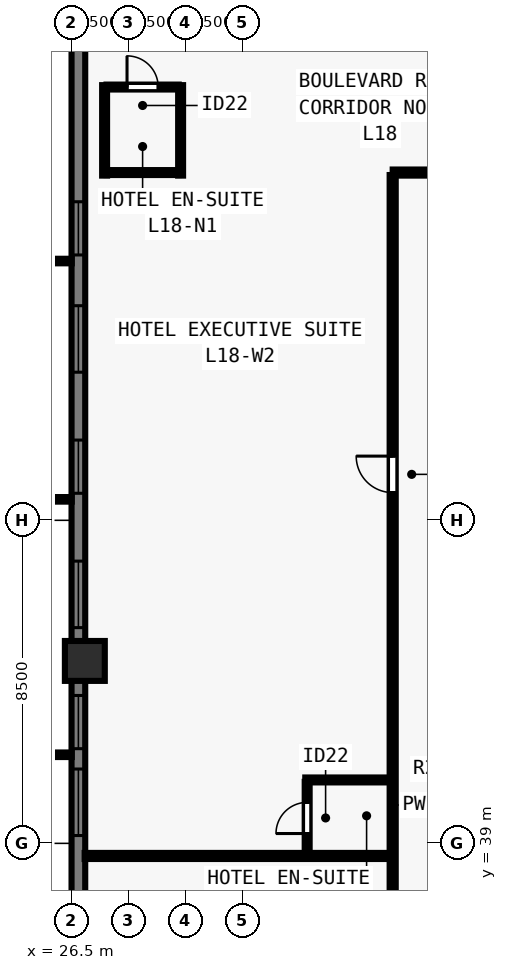
"""IFC4 building model, lengths in metres.
Left out: names, types, materials, properties, quantities, classifications, styles, units other than length and angle.
Written with IfcOpenShell. Run it as: python <this file> out.ifc"""

import sys

from ifc_helpers import new_model, si_unit, direction, frame, frame_2d, origin, origin_2d, place, context, subcontext, project, spatial, rectangle, extrude, element, fill, save


model = new_model("IFC4")
c1 = context("Model", 3, precision=1e-05, world=origin(), true_north=direction((0.0, 1.0)))
c2 = subcontext(c1, "Body", "Model", "MODEL_VIEW")
j1 = project(units=[si_unit("LENGTHUNIT", "METRE"), si_unit("PLANEANGLEUNIT", "RADIAN")], contexts=[c1])
p1 = place(None, origin())
s1 = spatial("IfcSite", under=j1, at=p1, CompositionType="ELEMENT")
p2 = place(p1, origin())
s2 = spatial("IfcBuilding", under=s1, at=p2, CompositionType="ELEMENT")
p3 = place(p2, frame((0.0, 0.0, 69.0)))
s3 = spatial("IfcBuildingStorey", under=s2, at=p3, CompositionType="ELEMENT", Elevation=69.0)
p4 = place(p3, frame((26.85, 43.8, 0.0), z_axis=(0.0, 0.0, 1.0), x_axis=(0.0, 1.0, 0.0)))
e1 = element("IfcColumn", 1, at=p4, inside=s3, PredefinedType="COLUMN", context=c2, shape_type="SweptSolid", body=[
    extrude(rectangle(XDim=1.05, YDim=1.05, at=origin_2d()), origin(), (0.0, 0.0, 1.0), 3.5),
])
p5 = place(p3, frame((26.68, 16.5, 0.0), z_axis=(0.0, 0.0, 1.0), x_axis=(0.0, 1.0, 0.0)))
e2 = element("IfcWall", 2, at=p5, inside=s3, PredefinedType="SOLIDWALL", context=c2, shape_type="SweptSolid", body=[
    extrude(rectangle(XDim=44.662, YDim=0.36, at=frame_2d((22.331, 0.0))), origin(), (0.0, 0.0, 1.0), 3.28),
])
p6 = place(p5, frame((5.28, 0.0, 0.8)))
e3 = element("IfcOpeningElement", 3, at=p6, cuts=e2, PredefinedType="OPENING", context=c2, shape_type="SweptSolid", body=[
    extrude(rectangle(XDim=1.4, YDim=1.544, at=frame_2d((0.7, 0.772))), frame((0.0, 0.19, 0.0), z_axis=(0.0, -1.0, 0.0), x_axis=(1.0, 0.0, 0.0)), (0.0, 0.0, 1.0), 0.38),
])
p7 = place(p5, frame((8.015, 0.0, 0.8)))
e4 = element("IfcOpeningElement", 4, at=p7, cuts=e2, PredefinedType="OPENING", context=c2, shape_type="SweptSolid", body=[
    extrude(rectangle(XDim=1.75, YDim=1.544, at=frame_2d((0.875, 0.772))), frame((0.0, 0.19, 0.0), z_axis=(0.0, -1.0, 0.0), x_axis=(1.0, 0.0, 0.0)), (0.0, 0.0, 1.0), 0.38),
])
p8 = place(p5, frame((11.551, 0.0, 0.8)))
e5 = element("IfcOpeningElement", 5, at=p8, cuts=e2, PredefinedType="OPENING", context=c2, shape_type="SweptSolid", body=[
    extrude(rectangle(XDim=1.4, YDim=1.544, at=frame_2d((0.7, 0.772))), frame((0.0, 0.19, 0.0), z_axis=(0.0, -1.0, 0.0), x_axis=(1.0, 0.0, 0.0)), (0.0, 0.0, 1.0), 0.38),
])
p9 = place(p5, frame((14.736, 0.0, 0.8)))
e6 = element("IfcOpeningElement", 6, at=p9, cuts=e2, PredefinedType="OPENING", context=c2, shape_type="SweptSolid", body=[
    extrude(rectangle(XDim=1.75, YDim=1.544, at=frame_2d((0.875, 0.772))), frame((0.0, 0.19, 0.0), z_axis=(0.0, -1.0, 0.0), x_axis=(1.0, 0.0, 0.0)), (0.0, 0.0, 1.0), 0.38),
])
p10 = place(p5, frame((18.721, 0.0, 0.8)))
e7 = element("IfcOpeningElement", 7, at=p10, cuts=e2, PredefinedType="OPENING", context=c2, shape_type="SweptSolid", body=[
    extrude(rectangle(XDim=1.4, YDim=1.544, at=frame_2d((0.7, 0.772))), frame((0.0, 0.19, 0.0), z_axis=(0.0, -1.0, 0.0), x_axis=(1.0, 0.0, 0.0)), (0.0, 0.0, 1.0), 0.38),
])
p11 = place(p5, frame((22.706, 0.0, 0.8)))
e8 = element("IfcOpeningElement", 8, at=p11, cuts=e2, PredefinedType="OPENING", context=c2, shape_type="SweptSolid", body=[
    extrude(rectangle(XDim=1.75, YDim=1.544, at=frame_2d((0.875, 0.772))), frame((0.0, 0.19, 0.0), z_axis=(0.0, -1.0, 0.0), x_axis=(1.0, 0.0, 0.0)), (0.0, 0.0, 1.0), 0.38),
])
p12 = place(p5, frame((24.991, 0.0, 0.8)))
e9 = element("IfcOpeningElement", 9, at=p12, cuts=e2, PredefinedType="OPENING", context=c2, shape_type="SweptSolid", body=[
    extrude(rectangle(XDim=1.4, YDim=1.544, at=frame_2d((0.7, 0.772))), frame((0.0, 0.19, 0.0), z_axis=(0.0, -1.0, 0.0), x_axis=(1.0, 0.0, 0.0)), (0.0, 0.0, 1.0), 0.38),
])
p13 = place(p5, frame((28.177, 0.0, 0.8)))
e10 = element("IfcOpeningElement", 10, at=p13, cuts=e2, PredefinedType="OPENING", context=c2, shape_type="SweptSolid", body=[
    extrude(rectangle(XDim=1.75, YDim=1.544, at=frame_2d((0.875, 0.772))), frame((0.0, 0.19, 0.0), z_axis=(0.0, -1.0, 0.0), x_axis=(1.0, 0.0, 0.0)), (0.0, 0.0, 1.0), 0.38),
])
p14 = place(p5, frame((31.711, 0.0, 0.8)))
e11 = element("IfcOpeningElement", 11, at=p14, cuts=e2, PredefinedType="OPENING", context=c2, shape_type="SweptSolid", body=[
    extrude(rectangle(XDim=1.4, YDim=1.544, at=frame_2d((0.7, 0.772))), frame((0.0, 0.19, 0.0), z_axis=(0.0, -1.0, 0.0), x_axis=(1.0, 0.0, 0.0)), (0.0, 0.0, 1.0), 0.38),
])
p15 = place(p5, frame((34.897, 0.0, 0.8)))
e12 = element("IfcOpeningElement", 12, at=p15, cuts=e2, PredefinedType="OPENING", context=c2, shape_type="SweptSolid", body=[
    extrude(rectangle(XDim=1.75, YDim=1.544, at=frame_2d((0.875, 0.772))), frame((0.0, 0.19, 0.0), z_axis=(0.0, -1.0, 0.0), x_axis=(1.0, 0.0, 0.0)), (0.0, 0.0, 1.0), 0.38),
])
p16 = place(p5, frame((37.982, 0.0, 0.8)))
e13 = element("IfcOpeningElement", 13, at=p16, cuts=e2, PredefinedType="OPENING", context=c2, shape_type="SweptSolid", body=[
    extrude(rectangle(XDim=1.4, YDim=1.544, at=frame_2d((0.7, 0.772))), frame((0.0, 0.19, 0.0), z_axis=(0.0, -1.0, 0.0), x_axis=(1.0, 0.0, 0.0)), (0.0, 0.0, 1.0), 0.38),
])
p17 = place(p3, frame((34.95, 56.65, 0.0), z_axis=(0.0, 0.0, 1.0), x_axis=(1.0, 0.0, 0.0)))
e14 = element("IfcWall", 14, at=p17, inside=s3, PredefinedType="PARTITIONING", context=c2, shape_type="SweptSolid", body=[
    extrude(rectangle(XDim=34.1, YDim=0.16, at=frame_2d((17.05, 0.0))), origin(), (0.0, 0.0, 1.0), 3.28),
])
p18 = place(p17, frame((4.166, 0.0, 0.0)))
e15 = element("IfcOpeningElement", 15, at=p18, cuts=e14, PredefinedType="OPENING", context=c2, shape_type="SweptSolid", body=[
    extrude(rectangle(XDim=0.96, YDim=2.15, at=frame_2d((0.48, 1.075))), frame((0.0, 0.09, 0.0), z_axis=(0.0, -1.0, 0.0), x_axis=(1.0, 0.0, 0.0)), (0.0, 0.0, 1.0), 0.18),
])
p19 = place(p17, frame((17.73, 0.0, 0.0)))
e16 = element("IfcOpeningElement", 16, at=p19, cuts=e14, PredefinedType="OPENING", context=c2, shape_type="SweptSolid", body=[
    extrude(rectangle(XDim=0.96, YDim=2.15, at=frame_2d((0.48, 1.075))), frame((0.0, 0.09, 0.0), z_axis=(0.0, -1.0, 0.0), x_axis=(1.0, 0.0, 0.0)), (0.0, 0.0, 1.0), 0.18),
])
p20 = place(p17, frame((30.134, 0.0, 0.0)))
e17 = element("IfcOpeningElement", 17, at=p20, cuts=e14, PredefinedType="OPENING", context=c2, shape_type="SweptSolid", body=[
    extrude(rectangle(XDim=0.96, YDim=2.15, at=frame_2d((0.48, 1.075))), frame((0.0, 0.09, 0.0), z_axis=(0.0, -1.0, 0.0), x_axis=(1.0, 0.0, 0.0)), (0.0, 0.0, 1.0), 0.18),
])
p21 = place(p3, frame((34.95, 21.415, 0.0), z_axis=(0.0, 0.0, 1.0), x_axis=(0.0, 1.0, 0.0)))
e18 = element("IfcWall", 18, at=p21, inside=s3, PredefinedType="PARTITIONING", context=c2, shape_type="SweptSolid", body=[
    extrude(rectangle(XDim=35.17, YDim=0.16, at=frame_2d((17.585, 0.0))), origin(), (0.0, 0.0, 1.0), 3.28),
])
p22 = place(p21, frame((9.414, 0.0, 0.0)))
e19 = element("IfcOpeningElement", 19, at=p22, cuts=e18, PredefinedType="OPENING", context=c2, shape_type="SweptSolid", body=[
    extrude(rectangle(XDim=0.96, YDim=2.15, at=frame_2d((0.48, 1.075))), frame((0.0, 0.09, 0.0), z_axis=(0.0, -1.0, 0.0), x_axis=(1.0, 0.0, 0.0)), (0.0, 0.0, 1.0), 0.18),
])
p23 = place(p21, frame((26.814, 0.0, 0.0)))
e20 = element("IfcOpeningElement", 20, at=p23, cuts=e18, PredefinedType="OPENING", context=c2, shape_type="SweptSolid", body=[
    extrude(rectangle(XDim=0.96, YDim=2.15, at=frame_2d((0.48, 1.075))), frame((0.0, 0.09, 0.0), z_axis=(0.0, -1.0, 0.0), x_axis=(1.0, 0.0, 0.0)), (0.0, 0.0, 1.0), 0.18),
])
for number, where, z_axis, x_axis in (
    (21, (27.37, 56.57, 0.0), (0.0, 0.0, 1.0), (0.0, 1.0, 0.0)),
    (22, (29.37, 56.57, 0.0), (0.0, 0.0, 1.0), (0.0, 1.0, 0.0)),
):
    element("IfcWall", number, at=place(p3, frame(where, z_axis=z_axis, x_axis=x_axis)), inside=s3, PredefinedType="PLUMBINGWALL", context=c2, shape_type="SweptSolid", body=[
        extrude(rectangle(XDim=2.38, YDim=0.13, at=frame_2d((1.19, 0.0))), origin(), (0.0, 0.0, 1.0), 3.28),
    ])
p24 = place(p3, frame((27.42, 58.9, 0.0), z_axis=(0.0, 0.0, 1.0), x_axis=(1.0, 0.0, 0.0)))
e23 = element("IfcWall", 23, at=p24, inside=s3, PredefinedType="PLUMBINGWALL", context=c2, shape_type="SweptSolid", body=[
    extrude(rectangle(XDim=1.9, YDim=0.13, at=frame_2d((0.95, 0.0))), origin(), (0.0, 0.0, 1.0), 3.28),
])
p25 = place(p24, frame((0.54, 0.0, 0.0)))
e24 = element("IfcOpeningElement", 24, at=p25, cuts=e23, PredefinedType="OPENING", context=c2, shape_type="SweptSolid", body=[
    extrude(rectangle(XDim=0.82, YDim=2.1, at=frame_2d((0.41, 1.05))), frame((0.0, 0.075, 0.0), z_axis=(0.0, -1.0, 0.0), x_axis=(1.0, 0.0, 0.0)), (0.0, 0.0, 1.0), 0.15),
])
p26 = place(p3, frame((27.42, 56.65, 0.0), z_axis=(0.0, 0.0, 1.0), x_axis=(1.0, 0.0, 0.0)))
e25 = element("IfcWall", 25, at=p26, inside=s3, PredefinedType="PLUMBINGWALL", context=c2, shape_type="SweptSolid", body=[
    extrude(rectangle(XDim=1.9, YDim=0.13, at=frame_2d((0.95, 0.0))), origin(), (0.0, 0.0, 1.0), 3.28),
])
p27 = place(p3, frame((26.845, 38.668, 0.0), z_axis=(0.0, 0.0, 1.0), x_axis=(1.0, 0.0, 0.0)))
e26 = element("IfcWall", 26, at=p27, inside=s3, PredefinedType="PARTITIONING", context=c2, shape_type="SweptSolid", body=[
    extrude(rectangle(XDim=8.04, YDim=0.16, at=frame_2d((4.02, 0.0))), origin(), (0.0, 0.0, 1.0), 2.849),
])
p28 = place(p3, frame((32.65, 40.668, 0.0), z_axis=(0.0, 0.0, 1.0), x_axis=(1.0, 0.0, 0.0)))
e27 = element("IfcWall", 27, at=p28, inside=s3, PredefinedType="PLUMBINGWALL", context=c2, shape_type="SweptSolid", body=[
    extrude(rectangle(XDim=2.235, YDim=0.13, at=frame_2d((1.118, 0.0))), origin(), (0.0, 0.0, 1.0), 3.28),
])
p29 = place(p3, frame((32.7, 38.733, 0.0), z_axis=(0.0, 0.0, 1.0), x_axis=(0.0, 1.0, 0.0)))
e28 = element("IfcWall", 28, at=p29, inside=s3, PredefinedType="PLUMBINGWALL", context=c2, shape_type="SweptSolid", body=[
    extrude(rectangle(XDim=1.885, YDim=0.13, at=frame_2d((0.942, 0.0))), origin(), (0.0, 0.0, 1.0), 3.28),
])
p30 = place(p29, frame((0.525, 0.0, 0.0)))
e29 = element("IfcOpeningElement", 29, at=p30, cuts=e28, PredefinedType="OPENING", context=c2, shape_type="SweptSolid", body=[
    extrude(rectangle(XDim=0.82, YDim=2.1, at=frame_2d((0.41, 1.05))), frame((0.0, 0.075, 0.0), z_axis=(0.0, -1.0, 0.0), x_axis=(1.0, 0.0, 0.0)), (0.0, 0.0, 1.0), 0.15),
])
p31 = place(p11, origin())
e30 = element("IfcWindow", 30, at=p31, inside=s3, PartitioningType="SINGLE_PANEL", PredefinedType="WINDOW", context=c2, shape_type="SweptSolid", body=[
    extrude(rectangle(XDim=1.75, YDim=1.544, at=frame_2d((0.875, 0.772))), frame((0.0, -0.05, 0.0), z_axis=(0.0, -1.0, 0.0), x_axis=(1.0, 0.0, 0.0)), (0.0, 0.0, 1.0), 0.06),
])
fill(e8, e30)
p32 = place(p12, origin())
e31 = element("IfcWindow", 31, at=p32, inside=s3, PartitioningType="SINGLE_PANEL", PredefinedType="WINDOW", context=c2, shape_type="SweptSolid", body=[
    extrude(rectangle(XDim=1.4, YDim=1.544, at=frame_2d((0.7, 0.772))), frame((0.0, -0.05, 0.0), z_axis=(0.0, -1.0, 0.0), x_axis=(1.0, 0.0, 0.0)), (0.0, 0.0, 1.0), 0.06),
])
fill(e9, e31)
p33 = place(p13, origin())
e32 = element("IfcWindow", 32, at=p33, inside=s3, PartitioningType="SINGLE_PANEL", PredefinedType="WINDOW", context=c2, shape_type="SweptSolid", body=[
    extrude(rectangle(XDim=1.75, YDim=1.544, at=frame_2d((0.875, 0.772))), frame((0.0, -0.05, 0.0), z_axis=(0.0, -1.0, 0.0), x_axis=(1.0, 0.0, 0.0)), (0.0, 0.0, 1.0), 0.06),
])
fill(e10, e32)
p34 = place(p14, origin())
e33 = element("IfcWindow", 33, at=p34, inside=s3, PartitioningType="SINGLE_PANEL", PredefinedType="WINDOW", context=c2, shape_type="SweptSolid", body=[
    extrude(rectangle(XDim=1.4, YDim=1.544, at=frame_2d((0.7, 0.772))), frame((0.0, -0.05, 0.0), z_axis=(0.0, -1.0, 0.0), x_axis=(1.0, 0.0, 0.0)), (0.0, 0.0, 1.0), 0.06),
])
fill(e11, e33)
p35 = place(p15, origin())
e34 = element("IfcWindow", 34, at=p35, inside=s3, PartitioningType="SINGLE_PANEL", PredefinedType="WINDOW", context=c2, shape_type="SweptSolid", body=[
    extrude(rectangle(XDim=1.75, YDim=1.544, at=frame_2d((0.875, 0.772))), frame((0.0, -0.05, 0.0), z_axis=(0.0, -1.0, 0.0), x_axis=(1.0, 0.0, 0.0)), (0.0, 0.0, 1.0), 0.06),
])
fill(e12, e34)
p36 = place(p16, origin())
e35 = element("IfcWindow", 35, at=p36, inside=s3, PartitioningType="SINGLE_PANEL", PredefinedType="WINDOW", context=c2, shape_type="SweptSolid", body=[
    extrude(rectangle(XDim=1.4, YDim=1.544, at=frame_2d((0.7, 0.772))), frame((0.0, -0.05, 0.0), z_axis=(0.0, -1.0, 0.0), x_axis=(1.0, 0.0, 0.0)), (0.0, 0.0, 1.0), 0.06),
])
fill(e13, e35)
p37 = place(p25, origin())
e36 = element("IfcDoor", 36, at=p37, inside=s3, OperationType="SINGLE_SWING_LEFT", PredefinedType="DOOR", context=c2, shape_type="SweptSolid", body=[
    extrude(rectangle(XDim=0.82, YDim=2.1, at=frame_2d((0.41, 1.05))), frame((0.0, 0.025, 0.0), z_axis=(0.0, -1.0, 0.0), x_axis=(1.0, 0.0, 0.0)), (0.0, 0.0, 1.0), 0.05),
])
fill(e24, e36)
p38 = place(p30, origin())
e37 = element("IfcDoor", 37, at=p38, inside=s3, OperationType="SINGLE_SWING_LEFT", PredefinedType="DOOR", context=c2, shape_type="SweptSolid", body=[
    extrude(rectangle(XDim=0.82, YDim=2.1, at=frame_2d((0.41, 1.05))), frame((0.0, 0.025, 0.0), z_axis=(0.0, -1.0, 0.0), x_axis=(1.0, 0.0, 0.0)), (0.0, 0.0, 1.0), 0.05),
])
fill(e29, e37)
p39 = place(p23, origin())
e38 = element("IfcDoor", 38, at=p39, inside=s3, OperationType="SINGLE_SWING_RIGHT", PredefinedType="DOOR", context=c2, shape_type="SweptSolid", body=[
    extrude(rectangle(XDim=0.96, YDim=2.15, at=frame_2d((0.48, 1.075))), frame((0.0, 0.025, 0.0), z_axis=(0.0, -1.0, 0.0), x_axis=(1.0, 0.0, 0.0)), (0.0, 0.0, 1.0), 0.05),
])
fill(e20, e38)
save(model, sys.argv[1])
